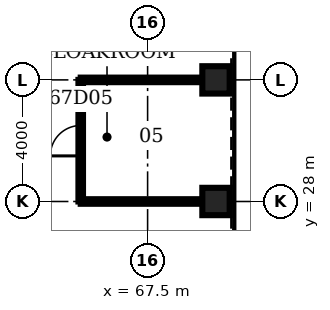
"""IFC4 building model, lengths in metres.
Left out: names, types, materials, properties, quantities, classifications, styles, units other than length and angle.
Written with IfcOpenShell. Run it as: python <this file> out.ifc"""

import sys

from ifc_helpers import new_model, si_unit, direction, frame, frame_2d, origin, origin_2d, place, context, subcontext, project, spatial, rectangle, hollow_rectangle, extrude, element, fill, save


model = new_model("IFC4")
c1 = context("Model", 3, precision=1e-05, world=origin(), true_north=direction((0.0, 1.0)))
c2 = subcontext(c1, "Body", "Model", "MODEL_VIEW")
j1 = project(units=[si_unit("LENGTHUNIT", "METRE"), si_unit("PLANEANGLEUNIT", "RADIAN")], contexts=[c1])
p1 = place(None, origin())
s1 = spatial("IfcSite", under=j1, at=p1, CompositionType="ELEMENT")
p2 = place(p1, origin())
s2 = spatial("IfcBuilding", under=s1, at=p2, CompositionType="ELEMENT")
p3 = place(p2, frame((0.0, 0.0, 296.3)))
s3 = spatial("IfcBuildingStorey", under=s2, at=p3, CompositionType="ELEMENT", Elevation=296.3)
for number, where, z_axis, x_axis in (
    (1, (69.75, 28.0, 0.0), (0.0, 0.0, 1.0), (1.0, 0.0, 0.0)),
    (2, (69.75, 32.0, 0.0), (0.0, 0.0, 1.0), (1.0, 0.0, 0.0)),
):
    element("IfcColumn", number, at=place(p3, frame(where, z_axis=z_axis, x_axis=x_axis)), inside=s3, PredefinedType="COLUMN", context=c2, shape_type="SweptSolid", body=[
        extrude(hollow_rectangle(XDim=0.9, YDim=0.9, WallThickness=0.06, at=origin_2d()), origin(), (0.0, 0.0, 1.0), 4.2),
    ])
for number, where, z_axis, x_axis in (
    (3, (65.3, 28.0, 0.0), (0.0, 0.0, 1.0), (1.0, 0.0, 0.0)),
    (4, (65.3, 32.0, 0.0), (0.0, 0.0, 1.0), (1.0, 0.0, 0.0)),
):
    element("IfcWall", number, at=place(p3, frame(where, z_axis=z_axis, x_axis=x_axis)), inside=s3, PredefinedType="PARTITIONING", context=c2, shape_type="SweptSolid", body=[
        extrude(rectangle(XDim=4.0, YDim=0.15, at=frame_2d((2.0, 0.0))), origin(), (0.0, 0.0, 1.0), 3.0),
    ])
p4 = place(p3, frame((65.3, 28.0, 0.0), z_axis=(0.0, 0.0, 1.0), x_axis=(0.0, 1.0, 0.0)))
e5 = element("IfcWall", 5, at=p4, inside=s3, PredefinedType="PARTITIONING", context=c2, shape_type="SweptSolid", body=[
    extrude(rectangle(XDim=4.0, YDim=0.15, at=frame_2d((2.0, 0.0))), origin(), (0.0, 0.0, 1.0), 3.0),
])
p5 = place(p4, frame((1.5, 0.0, 0.0)))
e6 = element("IfcOpeningElement", 6, at=p5, cuts=e5, PredefinedType="OPENING", context=c2, shape_type="SweptSolid", body=[
    extrude(rectangle(XDim=1.0, YDim=2.1, at=frame_2d((0.5, 1.05))), frame((0.0, 0.085, 0.0), z_axis=(0.0, -1.0, 0.0), x_axis=(1.0, 0.0, 0.0)), (0.0, 0.0, 1.0), 0.17),
])
p6 = place(p5, origin())
e7 = element("IfcDoor", 7, at=p6, inside=s3, OperationType="SINGLE_SWING_LEFT", PredefinedType="DOOR", context=c2, shape_type="SweptSolid", body=[
    extrude(rectangle(XDim=1.0, YDim=2.1, at=frame_2d((0.5, 1.05))), frame((0.0, 0.025, 0.0), z_axis=(0.0, -1.0, 0.0), x_axis=(1.0, 0.0, 0.0)), (0.0, 0.0, 1.0), 0.05),
])
fill(e6, e7)
save(model, sys.argv[1])
